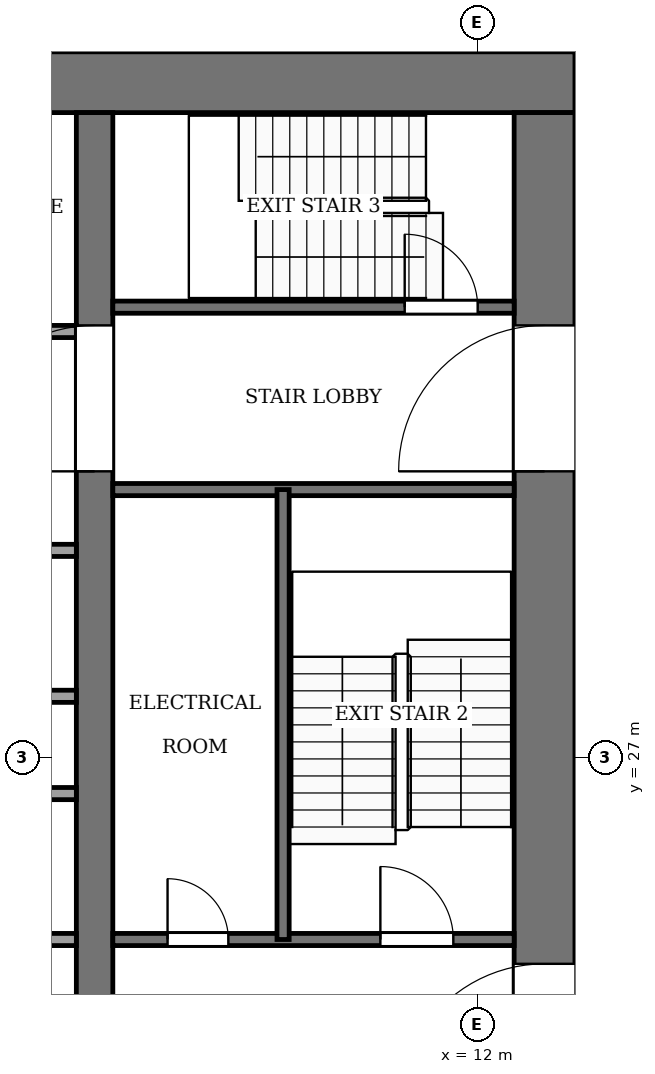
"""IFC4 building model, lengths in metres.
Left out: names, types, materials, properties, quantities, classifications, styles, units other than length and angle.
Written with IfcOpenShell. Run it as: python <this file> out.ifc"""

import sys

from ifc_helpers import new_model, si_unit, direction, frame, frame_2d, origin, place, context, subcontext, project, spatial, rectangle, extrude, element, fill, save


model = new_model("IFC4")
c1 = context("Model", 3, precision=1e-05, world=origin(), true_north=direction((0.0, 1.0)))
c2 = subcontext(c1, "Body", "Model", "MODEL_VIEW")
j1 = project(units=[si_unit("LENGTHUNIT", "METRE"), si_unit("PLANEANGLEUNIT", "RADIAN")], contexts=[c1])
p1 = place(None, origin())
s1 = spatial("IfcSite", under=j1, at=p1, CompositionType="ELEMENT")
p2 = place(p1, origin())
s2 = spatial("IfcBuilding", under=s1, at=p2, CompositionType="ELEMENT")
p3 = place(p2, frame((0.0, 0.0, 154.0)))
s3 = spatial("IfcBuildingStorey", under=s2, at=p3, CompositionType="ELEMENT", Elevation=154.0)
p4 = place(p3, frame((-13.6, 38.1, -0.13), z_axis=(0.0, 0.0, 1.0), x_axis=(1.0, 0.0, 0.0)))
e1 = element("IfcWall", 1, at=p4, inside=s3, PredefinedType="SHEAR", context=c2, shape_type="SweptSolid", body=[
    extrude(rectangle(XDim=27.2, YDim=1.0, at=frame_2d((13.6, 0.0))), origin(), (0.0, 0.0, 1.0), 4.0),
])
p5 = place(p3, frame((13.1, 18.4, -0.13), z_axis=(0.0, 0.0, 1.0), x_axis=(0.0, 1.0, 0.0)))
e2 = element("IfcWall", 2, at=p5, inside=s3, PredefinedType="SHEAR", context=c2, shape_type="SweptSolid", body=[
    extrude(rectangle(XDim=19.2, YDim=1.0, at=frame_2d((9.6, 0.0))), origin(), (0.0, 0.0, 1.0), 4.0),
])
p6 = place(p5, frame((2.8, 0.0, 0.13)))
e3 = element("IfcOpeningElement", 3, at=p6, cuts=e2, PredefinedType="OPENING", context=c2, shape_type="SweptSolid", body=[
    extrude(rectangle(XDim=2.4, YDim=2.4, at=frame_2d((1.2, 1.2))), frame((0.0, 0.51, 0.0), z_axis=(0.0, -1.0, 0.0), x_axis=(1.0, 0.0, 0.0)), (0.0, 0.0, 1.0), 1.02),
])
p7 = place(p5, frame((13.3, 0.0, 0.13)))
e4 = element("IfcOpeningElement", 4, at=p7, cuts=e2, PredefinedType="OPENING", context=c2, shape_type="SweptSolid", body=[
    extrude(rectangle(XDim=2.4, YDim=2.4, at=frame_2d((1.2, 1.2))), frame((0.0, 0.51, 0.0), z_axis=(0.0, -1.0, 0.0), x_axis=(1.0, 0.0, 0.0)), (0.0, 0.0, 1.0), 1.02),
])
p8 = place(p3, frame((5.7, 18.4, -0.13), z_axis=(0.0, 0.0, 1.0), x_axis=(0.0, 1.0, 0.0)))
e5 = element("IfcWall", 5, at=p8, inside=s3, PredefinedType="SHEAR", context=c2, shape_type="SweptSolid", body=[
    extrude(rectangle(XDim=19.2, YDim=0.6, at=frame_2d((9.6, 0.0))), origin(), (0.0, 0.0, 1.0), 4.0),
])
p9 = place(p8, frame((13.3, 0.0, 0.13)))
e6 = element("IfcOpeningElement", 6, at=p9, cuts=e5, PredefinedType="OPENING", context=c2, shape_type="SweptSolid", body=[
    extrude(rectangle(XDim=2.4, YDim=2.4, at=frame_2d((1.2, 1.2))), frame((0.0, 0.31, 0.0), z_axis=(0.0, -1.0, 0.0), x_axis=(1.0, 0.0, 0.0)), (0.0, 0.0, 1.0), 0.62),
])
p10 = place(p3, frame((-5.4, 24.0, 0.0), z_axis=(0.0, 0.0, 1.0), x_axis=(1.0, 0.0, 0.0)))
e7 = element("IfcWall", 7, at=p10, inside=s3, PredefinedType="PARTITIONING", context=c2, shape_type="SweptSolid", body=[
    extrude(rectangle(XDim=10.8, YDim=0.2, at=frame_2d((5.4, 0.0))), origin(), (0.0, 0.0, 1.0), 3.87),
])
p11 = place(p10, frame((0.75, 0.0, 0.0)))
e8 = element("IfcOpeningElement", 8, at=p11, cuts=e7, PredefinedType="OPENING", context=c2, shape_type="SweptSolid", body=[
    extrude(rectangle(XDim=1.2, YDim=2.2, at=frame_2d((0.6, 1.1))), frame((0.0, 0.11, 0.0), z_axis=(0.0, -1.0, 0.0), x_axis=(1.0, 0.0, 0.0)), (0.0, 0.0, 1.0), 0.22),
])
p12 = place(p10, frame((3.45, 0.0, 0.0)))
e9 = element("IfcOpeningElement", 9, at=p12, cuts=e7, PredefinedType="OPENING", context=c2, shape_type="SweptSolid", body=[
    extrude(rectangle(XDim=1.2, YDim=2.2, at=frame_2d((0.6, 1.1))), frame((0.0, 0.11, 0.0), z_axis=(0.0, -1.0, 0.0), x_axis=(1.0, 0.0, 0.0)), (0.0, 0.0, 1.0), 0.22),
])
p13 = place(p10, frame((6.15, 0.0, 0.0)))
e10 = element("IfcOpeningElement", 10, at=p13, cuts=e7, PredefinedType="OPENING", context=c2, shape_type="SweptSolid", body=[
    extrude(rectangle(XDim=1.2, YDim=2.2, at=frame_2d((0.6, 1.1))), frame((0.0, 0.11, 0.0), z_axis=(0.0, -1.0, 0.0), x_axis=(1.0, 0.0, 0.0)), (0.0, 0.0, 1.0), 0.22),
])
p14 = place(p10, frame((8.85, 0.0, 0.0)))
e11 = element("IfcOpeningElement", 11, at=p14, cuts=e7, PredefinedType="OPENING", context=c2, shape_type="SweptSolid", body=[
    extrude(rectangle(XDim=1.2, YDim=2.2, at=frame_2d((0.6, 1.1))), frame((0.0, 0.11, 0.0), z_axis=(0.0, -1.0, 0.0), x_axis=(1.0, 0.0, 0.0)), (0.0, 0.0, 1.0), 0.22),
])
p15 = place(p3, frame((6.0, 24.0, 0.0), z_axis=(0.0, 0.0, 1.0), x_axis=(1.0, 0.0, 0.0)))
e12 = element("IfcWall", 12, at=p15, inside=s3, PredefinedType="PARTITIONING", context=c2, shape_type="SweptSolid", body=[
    extrude(rectangle(XDim=6.6, YDim=0.2, at=frame_2d((3.3, 0.0))), origin(), (0.0, 0.0, 1.0), 3.87),
])
p16 = place(p15, frame((0.9, 0.0, 0.0)))
e13 = element("IfcOpeningElement", 13, at=p16, cuts=e12, PredefinedType="OPENING", context=c2, shape_type="SweptSolid", body=[
    extrude(rectangle(XDim=1.0, YDim=2.1, at=frame_2d((0.5, 1.05))), frame((0.0, 0.11, 0.0), z_axis=(0.0, -1.0, 0.0), x_axis=(1.0, 0.0, 0.0)), (0.0, 0.0, 1.0), 0.22),
])
p17 = place(p15, frame((4.4, 0.0, 0.0)))
e14 = element("IfcOpeningElement", 14, at=p17, cuts=e12, PredefinedType="OPENING", context=c2, shape_type="SweptSolid", body=[
    extrude(rectangle(XDim=1.2, YDim=2.2, at=frame_2d((0.6, 1.1))), frame((0.0, 0.11, 0.0), z_axis=(0.0, -1.0, 0.0), x_axis=(1.0, 0.0, 0.0)), (0.0, 0.0, 1.0), 0.22),
])
for number, where, z_axis, x_axis in (
    (15, (-5.4, 26.4, 0.0), (0.0, 0.0, 1.0), (1.0, 0.0, 0.0)),
    (16, (-5.4, 28.0, 0.0), (0.0, 0.0, 1.0), (1.0, 0.0, 0.0)),
    (17, (-5.4, 30.4, 0.0), (0.0, 0.0, 1.0), (1.0, 0.0, 0.0)),
):
    element("IfcWall", number, at=place(p3, frame(where, z_axis=z_axis, x_axis=x_axis)), inside=s3, PredefinedType="PARTITIONING", context=c2, shape_type="SweptSolid", body=[
        extrude(rectangle(XDim=10.8, YDim=0.2, at=frame_2d((5.4, 0.0))), origin(), (0.0, 0.0, 1.0), 3.87),
    ])
p18 = place(p3, frame((6.0, 31.4, 0.0), z_axis=(0.0, 0.0, 1.0), x_axis=(1.0, 0.0, 0.0)))
e18 = element("IfcWall", 18, at=p18, inside=s3, PredefinedType="PARTITIONING", context=c2, shape_type="SweptSolid", body=[
    extrude(rectangle(XDim=6.6, YDim=0.2, at=frame_2d((3.3, 0.0))), origin(), (0.0, 0.0, 1.0), 3.87),
])
p19 = place(p3, frame((-5.4, 34.0, 0.0), z_axis=(0.0, 0.0, 1.0), x_axis=(1.0, 0.0, 0.0)))
e19 = element("IfcWall", 19, at=p19, inside=s3, PredefinedType="PARTITIONING", context=c2, shape_type="SweptSolid", body=[
    extrude(rectangle(XDim=10.8, YDim=0.2, at=frame_2d((5.4, 0.0))), origin(), (0.0, 0.0, 1.0), 3.87),
])
p20 = place(p19, frame((6.15, 0.0, 0.0)))
e20 = element("IfcOpeningElement", 20, at=p20, cuts=e19, PredefinedType="OPENING", context=c2, shape_type="SweptSolid", body=[
    extrude(rectangle(XDim=1.2, YDim=2.2, at=frame_2d((0.6, 1.1))), frame((0.0, 0.11, 0.0), z_axis=(0.0, -1.0, 0.0), x_axis=(1.0, 0.0, 0.0)), (0.0, 0.0, 1.0), 0.22),
])
p21 = place(p19, frame((8.95, 0.0, 0.0)))
e21 = element("IfcOpeningElement", 21, at=p21, cuts=e19, PredefinedType="OPENING", context=c2, shape_type="SweptSolid", body=[
    extrude(rectangle(XDim=1.0, YDim=2.1, at=frame_2d((0.5, 1.05))), frame((0.0, 0.11, 0.0), z_axis=(0.0, -1.0, 0.0), x_axis=(1.0, 0.0, 0.0)), (0.0, 0.0, 1.0), 0.22),
])
p22 = place(p3, frame((6.0, 34.4, 0.0), z_axis=(0.0, 0.0, 1.0), x_axis=(1.0, 0.0, 0.0)))
e22 = element("IfcWall", 22, at=p22, inside=s3, PredefinedType="PARTITIONING", context=c2, shape_type="SweptSolid", body=[
    extrude(rectangle(XDim=6.6, YDim=0.2, at=frame_2d((3.3, 0.0))), origin(), (0.0, 0.0, 1.0), 3.87),
])
p23 = place(p22, frame((4.8, 0.0, 0.0)))
e23 = element("IfcOpeningElement", 23, at=p23, cuts=e22, PredefinedType="OPENING", context=c2, shape_type="SweptSolid", body=[
    extrude(rectangle(XDim=1.2, YDim=2.2, at=frame_2d((0.6, 1.1))), frame((0.0, 0.11, 0.0), z_axis=(0.0, -1.0, 0.0), x_axis=(1.0, 0.0, 0.0)), (0.0, 0.0, 1.0), 0.22),
])
p24 = place(p3, frame((8.8, 24.0, 0.0), z_axis=(0.0, 0.0, 1.0), x_axis=(0.0, 1.0, 0.0)))
e24 = element("IfcWall", 24, at=p24, inside=s3, PredefinedType="PARTITIONING", context=c2, shape_type="SweptSolid", body=[
    extrude(rectangle(XDim=7.4, YDim=0.2, at=frame_2d((3.7, 0.0))), origin(), (0.0, 0.0, 1.0), 3.87),
])
p25 = place(p16, origin())
e25 = element("IfcDoor", 25, at=p25, inside=s3, OperationType="SINGLE_SWING_LEFT", PredefinedType="DOOR", context=c2, shape_type="SweptSolid", body=[
    extrude(rectangle(XDim=1.0, YDim=2.1, at=frame_2d((0.5, 1.05))), frame((0.0, 0.025, 0.0), z_axis=(0.0, -1.0, 0.0), x_axis=(1.0, 0.0, 0.0)), (0.0, 0.0, 1.0), 0.05),
])
fill(e13, e25)
p26 = place(p17, origin())
e26 = element("IfcDoor", 26, at=p26, inside=s3, OperationType="SINGLE_SWING_LEFT", PredefinedType="DOOR", context=c2, shape_type="SweptSolid", body=[
    extrude(rectangle(XDim=1.2, YDim=2.2, at=frame_2d((0.6, 1.1))), frame((0.0, 0.025, 0.0), z_axis=(0.0, -1.0, 0.0), x_axis=(1.0, 0.0, 0.0)), (0.0, 0.0, 1.0), 0.05),
])
fill(e14, e26)
p27 = place(p23, origin())
e27 = element("IfcDoor", 27, at=p27, inside=s3, OperationType="SINGLE_SWING_RIGHT", PredefinedType="DOOR", context=c2, shape_type="SweptSolid", body=[
    extrude(rectangle(XDim=1.2, YDim=2.2, at=frame_2d((0.6, 1.1))), frame((0.0, 0.025, 0.0), z_axis=(0.0, -1.0, 0.0), x_axis=(1.0, 0.0, 0.0)), (0.0, 0.0, 1.0), 0.05),
])
fill(e23, e27)
p28 = place(p9, origin())
e28 = element("IfcDoor", 28, at=p28, inside=s3, OperationType="DOUBLE_DOOR_SINGLE_SWING", PredefinedType="DOOR", context=c2, shape_type="SweptSolid", body=[
    extrude(rectangle(XDim=2.4, YDim=2.4, at=frame_2d((1.2, 1.2))), frame((0.0, 0.025, 0.0), z_axis=(0.0, -1.0, 0.0), x_axis=(1.0, 0.0, 0.0)), (0.0, 0.0, 1.0), 0.05),
])
fill(e6, e28)
p29 = place(p6, origin())
e29 = element("IfcDoor", 29, at=p29, inside=s3, OperationType="DOUBLE_DOOR_SINGLE_SWING", PredefinedType="DOOR", context=c2, shape_type="SweptSolid", body=[
    extrude(rectangle(XDim=2.4, YDim=2.4, at=frame_2d((1.2, 1.2))), frame((0.0, 0.025, 0.0), z_axis=(0.0, -1.0, 0.0), x_axis=(1.0, 0.0, 0.0)), (0.0, 0.0, 1.0), 0.05),
])
fill(e3, e29)
p30 = place(p7, origin())
e30 = element("IfcDoor", 30, at=p30, inside=s3, OperationType="DOUBLE_DOOR_SINGLE_SWING", PredefinedType="DOOR", context=c2, shape_type="SweptSolid", body=[
    extrude(rectangle(XDim=2.4, YDim=2.4, at=frame_2d((1.2, 1.2))), frame((0.0, 0.025, 0.0), z_axis=(0.0, -1.0, 0.0), x_axis=(1.0, 0.0, 0.0)), (0.0, 0.0, 1.0), 0.05),
])
fill(e4, e30)
save(model, sys.argv[1])
